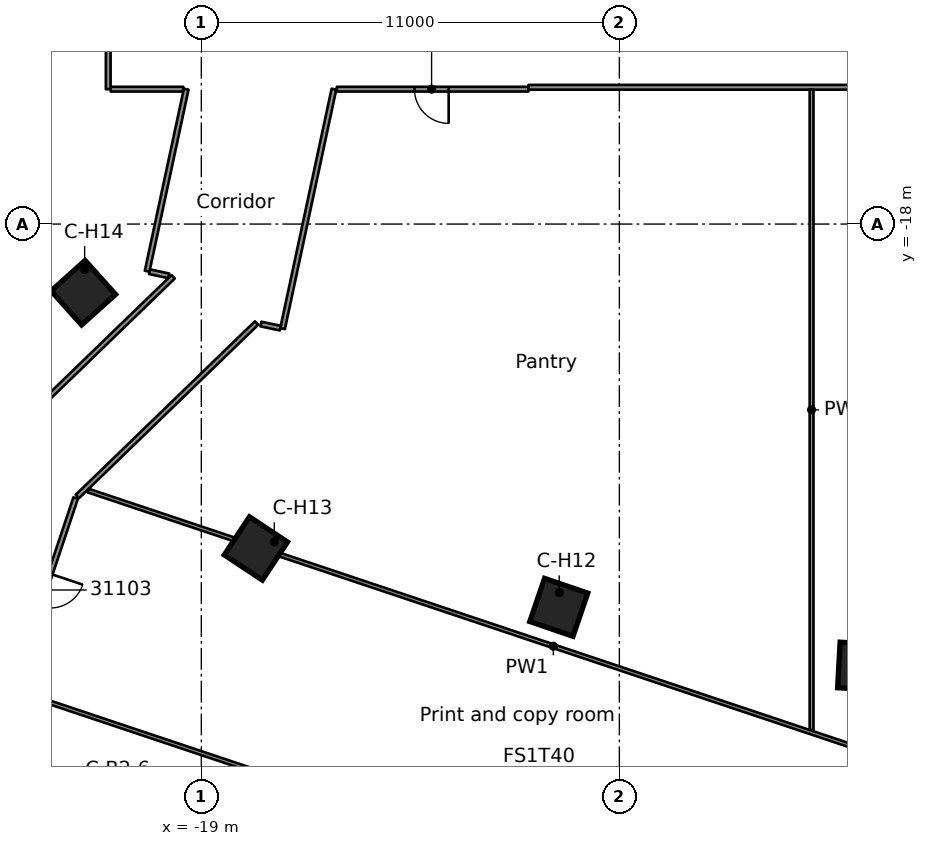
"""IFC4 building model, lengths in metres.
Left out: names, types, materials, properties, quantities, classifications, styles, units other than length and angle.
Written with IfcOpenShell. Run it as: python <this file> out.ifc"""

import sys

from ifc_helpers import new_model, si_unit, direction, frame, frame_2d, origin, origin_2d, place, context, subcontext, project, spatial, rectangle, extrude, element, fill, save


model = new_model("IFC4")
c1 = context("Model", 3, precision=1e-05, world=origin(), true_north=direction((0.0, 1.0)))
c2 = subcontext(c1, "Body", "Model", "MODEL_VIEW")
j1 = project(units=[si_unit("LENGTHUNIT", "METRE"), si_unit("PLANEANGLEUNIT", "RADIAN")], contexts=[c1])
p1 = place(None, origin())
s1 = spatial("IfcSite", under=j1, at=p1, CompositionType="ELEMENT")
p2 = place(p1, origin())
s2 = spatial("IfcBuilding", under=s1, at=p2, CompositionType="ELEMENT")
p3 = place(p2, frame((0.0, 0.0, 156.1)))
s3 = spatial("IfcBuildingStorey", under=s2, at=p3, CompositionType="ELEMENT", Elevation=156.1)
for number, where, z_axis, x_axis in (
    (1, (-1.625, -29.634, 0.0), (0.0, 0.0, 1.0), (-0.055, -0.998, 0.0)),
    (2, (-9.594, -28.085, 0.0), (0.0, 0.0, 1.0), (-0.323, -0.946, 0.0)),
    (3, (-17.564, -26.536, 0.0), (0.0, 0.0, 1.0), (-0.552, -0.834, 0.0)),
    (4, (-22.104, -19.806, 0.0), (0.0, 0.0, 1.0), (-0.745, -0.667, 0.0)),
):
    element("IfcColumn", number, at=place(p3, frame(where, z_axis=z_axis, x_axis=x_axis)), inside=s3, PredefinedType="COLUMN", context=c2, shape_type="SweptSolid", body=[
        extrude(rectangle(XDim=1.2, YDim=1.2, at=origin_2d()), origin(), (0.0, 0.0, 1.0), 3.5),
    ])
p4 = place(p3, frame((-23.935, -30.27, 0.0), z_axis=(0.0, 0.0, 1.0), x_axis=(0.948326561211, -0.317295971139, 0.0)))
e5 = element("IfcWall", 5, at=p4, inside=s3, PredefinedType="PARTITIONING", context=c2, shape_type="SweptSolid", body=[
    extrude(rectangle(XDim=26.187, YDim=0.1, at=frame_2d((13.094, 0.0))), origin(), (0.0, 0.0, 1.0), 3.08),
])
p5 = place(p3, frame((-21.98, -25.012, 0.0), z_axis=(0.0, 0.0, 1.0), x_axis=(0.948330909895, -0.317282973603, 0.0)))
e6 = element("IfcWall", 6, at=p5, inside=s3, PredefinedType="PARTITIONING", context=c2, shape_type="SweptSolid", body=[
    extrude(rectangle(XDim=25.816, YDim=0.1, at=frame_2d((12.908, 0.0))), origin(), (0.0, 0.0, 1.0), 3.08),
])
p6 = place(p3, frame((-17.433, -20.63, 0.0), z_axis=(0.0, 0.0, 1.0), x_axis=(0.977781820865, -0.209625167351, 0.0)))
e7 = element("IfcWall", 7, at=p6, inside=s3, PredefinedType="PARTITIONING", context=c2, shape_type="SweptSolid", body=[
    extrude(rectangle(XDim=0.521, YDim=0.125, at=frame_2d((0.26, 0.0))), origin(), (0.0, 0.0, 1.0), 3.08),
])
p7 = place(p3, frame((-20.364, -19.254, 0.0), z_axis=(0.0, 0.0, 1.0), x_axis=(0.977699164018, -0.210010344217, 0.0)))
e8 = element("IfcWall", 8, at=p7, inside=s3, PredefinedType="PARTITIONING", context=c2, shape_type="SweptSolid", body=[
    extrude(rectangle(XDim=0.52, YDim=0.125, at=frame_2d((0.26, 0.0))), origin(), (0.0, 0.0, 1.0), 3.08),
])
p8 = place(p3, frame((-21.387, -14.451, 0.0), z_axis=(0.0, 0.0, 1.0), x_axis=(1.0, 0.0, 0.0)))
e9 = element("IfcWall", 9, at=p8, inside=s3, PredefinedType="PARTITIONING", context=c2, shape_type="SweptSolid", body=[
    extrude(rectangle(XDim=1.912, YDim=0.125, at=frame_2d((0.956, 0.0))), origin(), (0.0, 0.0, 1.0), 3.08),
])
p9 = place(p3, frame((-10.391, -14.451, 0.0), z_axis=(0.0, 0.0, 1.0), x_axis=(-1.0, 0.0, 0.0)))
e10 = element("IfcWall", 10, at=p9, inside=s3, PredefinedType="PARTITIONING", context=c2, shape_type="SweptSolid", body=[
    extrude(rectangle(XDim=5.043, YDim=0.125, at=frame_2d((2.521, 0.0))), origin(), (0.0, 0.0, 1.0), 3.08),
])
p10 = place(p9, frame((2.1, 0.0, 0.0)))
e11 = element("IfcOpeningElement", 11, at=p10, cuts=e10, PredefinedType="OPENING", context=c2, shape_type="SweptSolid", body=[
    extrude(rectangle(XDim=0.9, YDim=2.1, at=frame_2d((0.45, 1.05))), frame((0.0, 0.073, 0.0), z_axis=(0.0, -1.0, 0.0), x_axis=(1.0, 0.0, 0.0)), (0.0, 0.0, 1.0), 0.145),
])
p11 = place(p3, frame((-10.39, -14.401, 0.0), z_axis=(0.0, 0.0, 1.0), x_axis=(1.0, 0.0, 0.0)))
e12 = element("IfcWall", 12, at=p11, inside=s3, PredefinedType="PARTITIONING", context=c2, shape_type="SweptSolid", body=[
    extrude(rectangle(XDim=14.817, YDim=0.125, at=frame_2d((7.408, 0.0))), origin(), (0.0, 0.0, 1.0), 3.08),
])
p12 = place(p3, frame((-17.547, -20.605, 0.0), z_axis=(0.0, 0.0, 1.0), x_axis=(-0.718656118165, -0.695365647572, 0.0)))
e13 = element("IfcWall", 13, at=p12, inside=s3, PredefinedType="PARTITIONING", context=c2, shape_type="SweptSolid", body=[
    extrude(rectangle(XDim=6.562, YDim=0.125, at=frame_2d((3.281, 0.0))), origin(), (0.0, 0.0, 1.0), 3.08),
])
p13 = place(p3, frame((-24.354, -23.85, 0.0), z_axis=(0.0, 0.0, 1.0), x_axis=(0.718689835624, 0.695330799095, 0.0)))
e14 = element("IfcWall", 14, at=p13, inside=s3, PredefinedType="PARTITIONING", context=c2, shape_type="SweptSolid", body=[
    extrude(rectangle(XDim=6.417, YDim=0.125, at=frame_2d((3.208, 0.0))), origin(), (0.0, 0.0, 1.0), 3.08),
])
p14 = place(p3, frame((-22.307, -25.21, 0.0), z_axis=(0.0, 0.0, 1.0), x_axis=(-0.317400526235, -0.948291572221, 0.0)))
e15 = element("IfcWall", 15, at=p14, inside=s3, PredefinedType="PARTITIONING", context=c2, shape_type="SweptSolid", body=[
    extrude(rectangle(XDim=10.615, YDim=0.125, at=frame_2d((5.307, 0.0))), origin(), (0.0, 0.0, 1.0), 3.08),
])
p15 = place(p14, frame((2.101, 0.0, 0.0)))
e16 = element("IfcOpeningElement", 16, at=p15, cuts=e15, PredefinedType="OPENING", context=c2, shape_type="SweptSolid", body=[
    extrude(rectangle(XDim=0.9, YDim=2.1, at=frame_2d((0.45, 1.05))), frame((0.0, 0.073, 0.0), z_axis=(0.0, -1.0, 0.0), x_axis=(1.0, 0.0, 0.0)), (0.0, 0.0, 1.0), 0.145),
])
p16 = place(p3, frame((-16.862, -20.752, 0.0), z_axis=(0.0, 0.0, 1.0), x_axis=(0.209655863281, 0.977775239506, 0.0)))
e17 = element("IfcWall", 17, at=p16, inside=s3, PredefinedType="PARTITIONING", context=c2, shape_type="SweptSolid", body=[
    extrude(rectangle(XDim=6.444, YDim=0.125, at=frame_2d((3.222, 0.0))), origin(), (0.0, 0.0, 1.0), 3.08),
])
p17 = place(p3, frame((-19.398, -14.451, 0.0), z_axis=(0.0, 0.0, 1.0), x_axis=(-0.209848984455, -0.977733810259, 0.0)))
e18 = element("IfcWall", 18, at=p17, inside=s3, PredefinedType="PARTITIONING", context=c2, shape_type="SweptSolid", body=[
    extrude(rectangle(XDim=4.899, YDim=0.125, at=frame_2d((2.45, 0.0))), origin(), (0.0, 0.0, 1.0), 3.08),
])
p18 = place(p3, frame((-2.942, -31.313, 0.0), z_axis=(0.0, 0.0, 1.0), x_axis=(0.0, 1.0, 0.0)))
e19 = element("IfcWall", 19, at=p18, inside=s3, PredefinedType="PARTITIONING", context=c2, shape_type="SweptSolid", body=[
    extrude(rectangle(XDim=16.85, YDim=0.1, at=frame_2d((8.425, 0.0))), origin(), (0.0, 0.0, 1.0), 3.08),
])
p19 = place(p3, frame((-21.45, -14.451, 0.0), z_axis=(0.0, 0.0, 1.0), x_axis=(0.0, 1.0, 0.0)))
e20 = element("IfcWall", 20, at=p19, inside=s3, PredefinedType="PARTITIONING", context=c2, shape_type="SweptSolid", body=[
    extrude(rectangle(XDim=28.902, YDim=0.125, at=frame_2d((14.451, 0.0))), origin(), (0.0, 0.0, 1.0), 3.08),
])
p20 = place(p19, frame((5.6, 0.0, 0.0)))
e21 = element("IfcOpeningElement", 21, at=p20, cuts=e20, PredefinedType="OPENING", context=c2, shape_type="SweptSolid", body=[
    extrude(rectangle(XDim=1.8, YDim=2.1, at=frame_2d((0.9, 1.05))), frame((0.0, 0.073, 0.0), z_axis=(0.0, -1.0, 0.0), x_axis=(1.0, 0.0, 0.0)), (0.0, 0.0, 1.0), 0.145),
])
p21 = place(p19, frame((27.051, 0.0, 0.0)))
e22 = element("IfcOpeningElement", 22, at=p21, cuts=e20, PredefinedType="OPENING", context=c2, shape_type="SweptSolid", body=[
    extrude(rectangle(XDim=1.1, YDim=2.1, at=frame_2d((0.55, 1.05))), frame((0.0, 0.073, 0.0), z_axis=(0.0, -1.0, 0.0), x_axis=(1.0, 0.0, 0.0)), (0.0, 0.0, 1.0), 0.145),
])
p22 = place(p19, frame((19.327, 0.0, 0.0)))
e23 = element("IfcOpeningElement", 23, at=p22, cuts=e20, PredefinedType="OPENING", context=c2, shape_type="SweptSolid", body=[
    extrude(rectangle(XDim=1.1, YDim=2.1, at=frame_2d((0.55, 1.05))), frame((0.0, 0.073, 0.0), z_axis=(0.0, -1.0, 0.0), x_axis=(1.0, 0.0, 0.0)), (0.0, 0.0, 1.0), 0.145),
])
p23 = place(p10, origin())
e24 = element("IfcDoor", 24, at=p23, inside=s3, OperationType="SINGLE_SWING_RIGHT", PredefinedType="DOOR", context=c2, shape_type="SweptSolid", body=[
    extrude(rectangle(XDim=0.9, YDim=2.1, at=frame_2d((0.45, 1.05))), frame((0.0, 0.025, 0.0), z_axis=(0.0, -1.0, 0.0), x_axis=(1.0, 0.0, 0.0)), (0.0, 0.0, 1.0), 0.05),
])
fill(e11, e24)
save(model, sys.argv[1])
